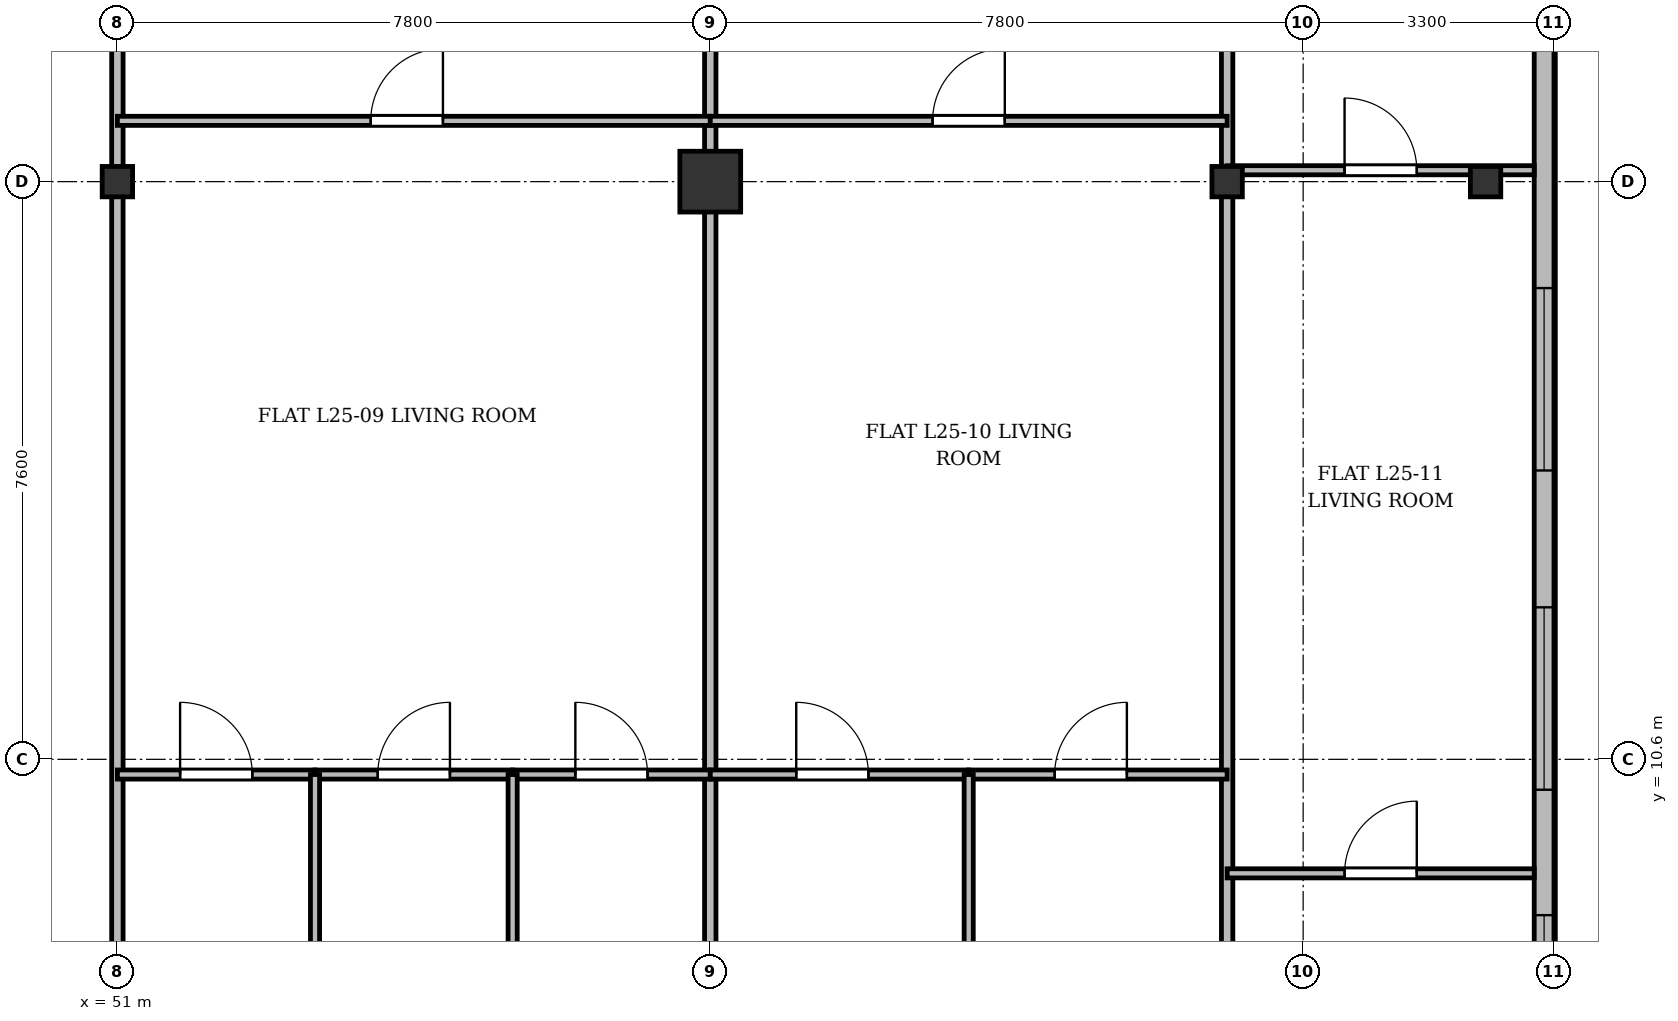
"""IFC4 building model, lengths in metres.
Left out: names, types, materials, properties, quantities, classifications, styles, units other than length and angle.
Written with IfcOpenShell. Run it as: python <this file> out.ifc"""

import sys

from ifc_helpers import new_model, si_unit, direction, frame, frame_2d, origin, origin_2d, place, context, subcontext, project, spatial, rectangle, i_section, extrude, source, transform, mapped, element, fill, save


model = new_model("IFC4")
c1 = context("Model", 3, precision=1e-05, world=origin(), true_north=direction((0.0, 1.0)))
c2 = subcontext(c1, "Body", "Model", "MODEL_VIEW")
j1 = project(units=[si_unit("LENGTHUNIT", "METRE"), si_unit("PLANEANGLEUNIT", "RADIAN")], contexts=[c1])
p1 = place(None, origin())
s1 = spatial("IfcSite", under=j1, at=p1, CompositionType="ELEMENT")
p2 = place(p1, origin())
s2 = spatial("IfcBuilding", under=s1, at=p2, CompositionType="ELEMENT")
p3 = place(p2, frame((0.0, 0.0, 99.7)))
s3 = spatial("IfcBuildingStorey", under=s2, at=p3, CompositionType="ELEMENT", Elevation=99.7)
m1 = source(origin(), c2, "Body", "SweptSolid", [
    extrude(i_section(OverallWidth=0.4, OverallDepth=0.4, WebThickness=0.022, FlangeThickness=0.035, at=origin_2d()), origin(), (0.0, 0.0, 1.0), 3.6),
])
p4 = place(p3, frame((51.0, 18.2, 0.0), z_axis=(0.0, 0.0, 1.0), x_axis=(1.0, 0.0, 0.0)))
e1 = element("IfcColumn", 1, at=p4, inside=s3, PredefinedType="COLUMN", context=c2, shape_type="MappedRepresentation", body=[
    mapped(m1, transform((0.0, 0.0, 0.0), x_axis=(1.0, 0.0, 0.0), y_axis=(0.0, 1.0, 0.0), z_axis=(0.0, 0.0, 1.0), scale=1.0)),
])
m2 = source(origin(), c2, "Body", "SweptSolid", [
    extrude(rectangle(XDim=0.8, YDim=0.8, at=origin_2d()), origin(), (0.0, 0.0, 1.0), 3.6),
])
p5 = place(p3, frame((58.8, 18.2, 0.0), z_axis=(0.0, 0.0, 1.0), x_axis=(1.0, 0.0, 0.0)))
e2 = element("IfcColumn", 2, at=p5, inside=s3, PredefinedType="COLUMN", context=c2, shape_type="MappedRepresentation", body=[
    mapped(m2, transform((0.0, 0.0, 0.0), x_axis=(1.0, 0.0, 0.0), y_axis=(0.0, 1.0, 0.0), z_axis=(0.0, 0.0, 1.0), scale=1.0)),
])
for number, where, z_axis, x_axis in (
    (3, (65.6, 18.2, 0.0), (0.0, 0.0, 1.0), (1.0, 0.0, 0.0)),
    (4, (69.0, 18.2, 0.0), (0.0, 0.0, 1.0), (1.0, 0.0, 0.0)),
):
    element("IfcColumn", number, at=place(p3, frame(where, z_axis=z_axis, x_axis=x_axis)), inside=s3, PredefinedType="COLUMN", context=c2, shape_type="MappedRepresentation", body=[
        mapped(m1, transform((0.0, 0.0, 0.0), x_axis=(1.0, 0.0, 0.0), y_axis=(0.0, 1.0, 0.0), z_axis=(0.0, 0.0, 1.0), scale=1.0)),
    ])
p6 = place(p3, frame((69.77, 45.5, 0.0), z_axis=(0.0, 0.0, 1.0), x_axis=(0.0, -1.0, 0.0)))
e5 = element("IfcWall", 5, at=p6, inside=s3, PredefinedType="SOLIDWALL", context=c2, shape_type="SweptSolid", body=[
    extrude(rectangle(XDim=39.6, YDim=0.26, at=frame_2d((19.8, 0.0))), origin(), (0.0, 0.0, 1.0), 3.34),
])
p7 = place(p6, frame((36.95, 0.0, 0.92)))
e6 = element("IfcOpeningElement", 6, at=p7, cuts=e5, PredefinedType="OPENING", context=c2, shape_type="SweptSolid", body=[
    extrude(rectangle(XDim=1.2, YDim=1.65, at=frame_2d((0.6, 0.825))), frame((0.0, 0.14, 0.0), z_axis=(0.0, -1.0, 0.0), x_axis=(1.0, 0.0, 0.0)), (0.0, 0.0, 1.0), 0.28),
])
p8 = place(p6, frame((32.9, 0.0, 0.92)))
e7 = element("IfcOpeningElement", 7, at=p8, cuts=e5, PredefinedType="OPENING", context=c2, shape_type="SweptSolid", body=[
    extrude(rectangle(XDim=2.4, YDim=2.1, at=frame_2d((1.2, 1.05))), frame((0.0, 0.14, 0.0), z_axis=(0.0, -1.0, 0.0), x_axis=(1.0, 0.0, 0.0)), (0.0, 0.0, 1.0), 0.28),
])
p9 = place(p6, frame((28.7, 0.0, 0.92)))
e8 = element("IfcOpeningElement", 8, at=p9, cuts=e5, PredefinedType="OPENING", context=c2, shape_type="SweptSolid", body=[
    extrude(rectangle(XDim=2.4, YDim=2.1, at=frame_2d((1.2, 1.05))), frame((0.0, 0.14, 0.0), z_axis=(0.0, -1.0, 0.0), x_axis=(1.0, 0.0, 0.0)), (0.0, 0.0, 1.0), 0.28),
])
p10 = place(p6, frame((21.5, 0.0, 0.92)))
e9 = element("IfcOpeningElement", 9, at=p10, cuts=e5, PredefinedType="OPENING", context=c2, shape_type="SweptSolid", body=[
    extrude(rectangle(XDim=2.4, YDim=2.1, at=frame_2d((1.2, 1.05))), frame((0.0, 0.14, 0.0), z_axis=(0.0, -1.0, 0.0), x_axis=(1.0, 0.0, 0.0)), (0.0, 0.0, 1.0), 0.28),
])
p11 = place(p6, frame((7.5, 0.0, 0.92)))
e10 = element("IfcOpeningElement", 10, at=p11, cuts=e5, PredefinedType="OPENING", context=c2, shape_type="SweptSolid", body=[
    extrude(rectangle(XDim=2.4, YDim=2.1, at=frame_2d((1.2, 1.05))), frame((0.0, 0.14, 0.0), z_axis=(0.0, -1.0, 0.0), x_axis=(1.0, 0.0, 0.0)), (0.0, 0.0, 1.0), 0.28),
])
p12 = place(p6, frame((4.5, 0.0, 0.92)))
e11 = element("IfcOpeningElement", 11, at=p12, cuts=e5, PredefinedType="OPENING", context=c2, shape_type="SweptSolid", body=[
    extrude(rectangle(XDim=1.2, YDim=1.65, at=frame_2d((0.6, 0.825))), frame((0.0, 0.14, 0.0), z_axis=(0.0, -1.0, 0.0), x_axis=(1.0, 0.0, 0.0)), (0.0, 0.0, 1.0), 0.28),
])
p13 = place(p6, frame((1.15, 0.0, 0.92)))
e12 = element("IfcOpeningElement", 12, at=p13, cuts=e5, PredefinedType="OPENING", context=c2, shape_type="SweptSolid", body=[
    extrude(rectangle(XDim=1.2, YDim=1.65, at=frame_2d((0.6, 0.825))), frame((0.0, 0.14, 0.0), z_axis=(0.0, -1.0, 0.0), x_axis=(1.0, 0.0, 0.0)), (0.0, 0.0, 1.0), 0.28),
])
for number, where, z_axis, x_axis in (
    (13, (51.0, 3.145, 0.0), (0.0, 0.0, 1.0), (0.0, 1.0, 0.0)),
    (14, (58.8, 3.145, 0.0), (0.0, 0.0, 1.0), (0.0, 1.0, 0.0)),
    (15, (65.6, 3.145, 0.0), (0.0, 0.0, 1.0), (0.0, 1.0, 0.0)),
):
    element("IfcWall", number, at=place(p3, frame(where, z_axis=z_axis, x_axis=x_axis)), inside=s3, PredefinedType="PARTITIONING", context=c2, shape_type="SweptSolid", body=[
        extrude(rectangle(XDim=24.455, YDim=0.15, at=frame_2d((12.228, 0.0))), origin(), (0.0, 0.0, 1.0), 2.84),
    ])
p14 = place(p3, frame((51.0, 19.0, 0.0), z_axis=(0.0, 0.0, 1.0), x_axis=(1.0, 0.0, 0.0)))
e16 = element("IfcWall", 16, at=p14, inside=s3, PredefinedType="PARTITIONING", context=c2, shape_type="SweptSolid", body=[
    extrude(rectangle(XDim=7.8, YDim=0.12, at=frame_2d((3.9, 0.0))), origin(), (0.0, 0.0, 1.0), 2.84),
])
p15 = place(p14, frame((3.333, 0.0, 0.0)))
e17 = element("IfcOpeningElement", 17, at=p15, cuts=e16, PredefinedType="OPENING", context=c2, shape_type="SweptSolid", body=[
    extrude(rectangle(XDim=0.95, YDim=2.15, at=frame_2d((0.475, 1.075))), frame((0.0, 0.07, 0.0), z_axis=(0.0, -1.0, 0.0), x_axis=(1.0, 0.0, 0.0)), (0.0, 0.0, 1.0), 0.14),
])
p16 = place(p3, frame((51.0, 10.4, 0.0), z_axis=(0.0, 0.0, 1.0), x_axis=(1.0, 0.0, 0.0)))
e18 = element("IfcWall", 18, at=p16, inside=s3, PredefinedType="PARTITIONING", context=c2, shape_type="SweptSolid", body=[
    extrude(rectangle(XDim=2.6, YDim=0.12, at=frame_2d((1.3, 0.0))), origin(), (0.0, 0.0, 1.0), 2.84),
])
p17 = place(p16, frame((0.825, 0.0, 0.0)))
e19 = element("IfcOpeningElement", 19, at=p17, cuts=e18, PredefinedType="OPENING", context=c2, shape_type="SweptSolid", body=[
    extrude(rectangle(XDim=0.95, YDim=2.15, at=frame_2d((0.475, 1.075))), frame((0.0, 0.07, 0.0), z_axis=(0.0, -1.0, 0.0), x_axis=(1.0, 0.0, 0.0)), (0.0, 0.0, 1.0), 0.14),
])
p18 = place(p3, frame((53.6, 10.4, 0.0), z_axis=(0.0, 0.0, 1.0), x_axis=(1.0, 0.0, 0.0)))
e20 = element("IfcWall", 20, at=p18, inside=s3, PredefinedType="PARTITIONING", context=c2, shape_type="SweptSolid", body=[
    extrude(rectangle(XDim=2.6, YDim=0.12, at=frame_2d((1.3, 0.0))), origin(), (0.0, 0.0, 1.0), 3.34),
])
p19 = place(p18, frame((0.825, 0.0, 0.0)))
e21 = element("IfcOpeningElement", 21, at=p19, cuts=e20, PredefinedType="OPENING", context=c2, shape_type="SweptSolid", body=[
    extrude(rectangle(XDim=0.95, YDim=2.15, at=frame_2d((0.475, 1.075))), frame((0.0, 0.07, 0.0), z_axis=(0.0, -1.0, 0.0), x_axis=(1.0, 0.0, 0.0)), (0.0, 0.0, 1.0), 0.14),
])
p20 = place(p3, frame((53.6, 3.145, 0.0), z_axis=(0.0, 0.0, 1.0), x_axis=(0.0, 1.0, 0.0)))
e22 = element("IfcWall", 22, at=p20, inside=s3, PredefinedType="PARTITIONING", context=c2, shape_type="SweptSolid", body=[
    extrude(rectangle(XDim=7.255, YDim=0.12, at=frame_2d((3.627, 0.0))), origin(), (0.0, 0.0, 1.0), 2.752),
])
p21 = place(p3, frame((56.2, 10.4, 0.0), z_axis=(0.0, 0.0, 1.0), x_axis=(1.0, 0.0, 0.0)))
e23 = element("IfcWall", 23, at=p21, inside=s3, PredefinedType="PARTITIONING", context=c2, shape_type="SweptSolid", body=[
    extrude(rectangle(XDim=2.6, YDim=0.12, at=frame_2d((1.3, 0.0))), origin(), (0.0, 0.0, 1.0), 2.84),
])
p22 = place(p21, frame((0.825, 0.0, 0.0)))
e24 = element("IfcOpeningElement", 24, at=p22, cuts=e23, PredefinedType="OPENING", context=c2, shape_type="SweptSolid", body=[
    extrude(rectangle(XDim=0.95, YDim=2.15, at=frame_2d((0.475, 1.075))), frame((0.0, 0.07, 0.0), z_axis=(0.0, -1.0, 0.0), x_axis=(1.0, 0.0, 0.0)), (0.0, 0.0, 1.0), 0.14),
])
p23 = place(p3, frame((56.2, 3.145, 0.0), z_axis=(0.0, 0.0, 1.0), x_axis=(0.0, 1.0, 0.0)))
e25 = element("IfcWall", 25, at=p23, inside=s3, PredefinedType="PARTITIONING", context=c2, shape_type="SweptSolid", body=[
    extrude(rectangle(XDim=7.255, YDim=0.12, at=frame_2d((3.627, 0.0))), origin(), (0.0, 0.0, 1.0), 2.752),
])
p24 = place(p3, frame((58.8, 19.0, 0.0), z_axis=(0.0, 0.0, 1.0), x_axis=(1.0, 0.0, 0.0)))
e26 = element("IfcWall", 26, at=p24, inside=s3, PredefinedType="PARTITIONING", context=c2, shape_type="SweptSolid", body=[
    extrude(rectangle(XDim=6.8, YDim=0.12, at=frame_2d((3.4, 0.0))), origin(), (0.0, 0.0, 1.0), 2.84),
])
p25 = place(p24, frame((2.925, 0.0, 0.0)))
e27 = element("IfcOpeningElement", 27, at=p25, cuts=e26, PredefinedType="OPENING", context=c2, shape_type="SweptSolid", body=[
    extrude(rectangle(XDim=0.95, YDim=2.15, at=frame_2d((0.475, 1.075))), frame((0.0, 0.07, 0.0), z_axis=(0.0, -1.0, 0.0), x_axis=(1.0, 0.0, 0.0)), (0.0, 0.0, 1.0), 0.14),
])
p26 = place(p3, frame((58.8, 10.4, 0.0), z_axis=(0.0, 0.0, 1.0), x_axis=(1.0, 0.0, 0.0)))
e28 = element("IfcWall", 28, at=p26, inside=s3, PredefinedType="PARTITIONING", context=c2, shape_type="SweptSolid", body=[
    extrude(rectangle(XDim=3.4, YDim=0.12, at=frame_2d((1.7, 0.0))), origin(), (0.0, 0.0, 1.0), 2.84),
])
p27 = place(p26, frame((1.131, 0.0, 0.0)))
e29 = element("IfcOpeningElement", 29, at=p27, cuts=e28, PredefinedType="OPENING", context=c2, shape_type="SweptSolid", body=[
    extrude(rectangle(XDim=0.95, YDim=2.15, at=frame_2d((0.475, 1.075))), frame((0.0, 0.07, 0.0), z_axis=(0.0, -1.0, 0.0), x_axis=(1.0, 0.0, 0.0)), (0.0, 0.0, 1.0), 0.14),
])
p28 = place(p3, frame((62.2, 10.4, 0.0), z_axis=(0.0, 0.0, 1.0), x_axis=(1.0, 0.0, 0.0)))
e30 = element("IfcWall", 30, at=p28, inside=s3, PredefinedType="PARTITIONING", context=c2, shape_type="SweptSolid", body=[
    extrude(rectangle(XDim=3.4, YDim=0.12, at=frame_2d((1.7, 0.0))), origin(), (0.0, 0.0, 1.0), 2.84),
])
p29 = place(p28, frame((1.131, 0.0, 0.0)))
e31 = element("IfcOpeningElement", 31, at=p29, cuts=e30, PredefinedType="OPENING", context=c2, shape_type="SweptSolid", body=[
    extrude(rectangle(XDim=0.95, YDim=2.15, at=frame_2d((0.475, 1.075))), frame((0.0, 0.07, 0.0), z_axis=(0.0, -1.0, 0.0), x_axis=(1.0, 0.0, 0.0)), (0.0, 0.0, 1.0), 0.14),
])
p30 = place(p3, frame((62.2, 3.145, 0.0), z_axis=(0.0, 0.0, 1.0), x_axis=(0.0, 1.0, 0.0)))
e32 = element("IfcWall", 32, at=p30, inside=s3, PredefinedType="PARTITIONING", context=c2, shape_type="SweptSolid", body=[
    extrude(rectangle(XDim=7.255, YDim=0.12, at=frame_2d((3.627, 0.0))), origin(), (0.0, 0.0, 1.0), 2.752),
])
p31 = place(p3, frame((65.6, 18.35, 0.0), z_axis=(0.0, 0.0, 1.0), x_axis=(1.0, 0.0, 0.0)))
e33 = element("IfcWall", 33, at=p31, inside=s3, PredefinedType="PARTITIONING", context=c2, shape_type="SweptSolid", body=[
    extrude(rectangle(XDim=4.04, YDim=0.12, at=frame_2d((2.02, 0.0))), origin(), (0.0, 0.0, 1.0), 2.752),
])
p32 = place(p31, frame((1.545, 0.0, 0.0)))
e34 = element("IfcOpeningElement", 34, at=p32, cuts=e33, PredefinedType="OPENING", context=c2, shape_type="SweptSolid", body=[
    extrude(rectangle(XDim=0.95, YDim=2.15, at=frame_2d((0.475, 1.075))), frame((0.0, 0.07, 0.0), z_axis=(0.0, -1.0, 0.0), x_axis=(1.0, 0.0, 0.0)), (0.0, 0.0, 1.0), 0.14),
])
p33 = place(p3, frame((65.6, 9.1, 0.0), z_axis=(0.0, 0.0, 1.0), x_axis=(1.0, 0.0, 0.0)))
e35 = element("IfcWall", 35, at=p33, inside=s3, PredefinedType="PARTITIONING", context=c2, shape_type="SweptSolid", body=[
    extrude(rectangle(XDim=4.04, YDim=0.12, at=frame_2d((2.02, 0.0))), origin(), (0.0, 0.0, 1.0), 2.84),
])
p34 = place(p33, frame((1.545, 0.0, 0.0)))
e36 = element("IfcOpeningElement", 36, at=p34, cuts=e35, PredefinedType="OPENING", context=c2, shape_type="SweptSolid", body=[
    extrude(rectangle(XDim=0.95, YDim=2.15, at=frame_2d((0.475, 1.075))), frame((0.0, 0.07, 0.0), z_axis=(0.0, -1.0, 0.0), x_axis=(1.0, 0.0, 0.0)), (0.0, 0.0, 1.0), 0.14),
])
m3 = source(origin(), c2, "Body", "SweptSolid", [
    extrude(rectangle(XDim=1.2, YDim=1.65, at=frame_2d((0.6, 0.825))), frame((0.0, 0.03, 0.0), z_axis=(0.0, -1.0, 0.0), x_axis=(1.0, 0.0, 0.0)), (0.0, 0.0, 1.0), 0.06),
])
p35 = place(p7, origin())
e37 = element("IfcWindow", 37, at=p35, inside=s3, PartitioningType="SINGLE_PANEL", PredefinedType="WINDOW", context=c2, shape_type="MappedRepresentation", body=[
    mapped(m3, transform((0.0, 0.0, 0.0), x_axis=(1.0, 0.0, 0.0), y_axis=(0.0, 1.0, 0.0), z_axis=(0.0, 0.0, 1.0), scale=1.0)),
])
fill(e6, e37)
m4 = source(origin(), c2, "Body", "SweptSolid", [
    extrude(rectangle(XDim=2.4, YDim=2.1, at=frame_2d((1.2, 1.05))), frame((0.0, 0.03, 0.0), z_axis=(0.0, -1.0, 0.0), x_axis=(1.0, 0.0, 0.0)), (0.0, 0.0, 1.0), 0.06),
])
p36 = place(p8, origin())
e38 = element("IfcWindow", 38, at=p36, inside=s3, PartitioningType="SINGLE_PANEL", PredefinedType="WINDOW", context=c2, shape_type="MappedRepresentation", body=[
    mapped(m4, transform((0.0, 0.0, 0.0), x_axis=(1.0, 0.0, 0.0), y_axis=(0.0, 1.0, 0.0), z_axis=(0.0, 0.0, 1.0), scale=1.0)),
])
fill(e7, e38)
p37 = place(p9, origin())
e39 = element("IfcWindow", 39, at=p37, inside=s3, PartitioningType="SINGLE_PANEL", PredefinedType="WINDOW", context=c2, shape_type="MappedRepresentation", body=[
    mapped(m4, transform((0.0, 0.0, 0.0), x_axis=(1.0, 0.0, 0.0), y_axis=(0.0, 1.0, 0.0), z_axis=(0.0, 0.0, 1.0), scale=1.0)),
])
fill(e8, e39)
m5 = source(origin(), c2, "Body", "SweptSolid", [
    extrude(rectangle(XDim=0.95, YDim=2.15, at=frame_2d((0.475, 1.075))), frame((0.0, 0.025, 0.0), z_axis=(0.0, -1.0, 0.0), x_axis=(1.0, 0.0, 0.0)), (0.0, 0.0, 1.0), 0.05),
])
p38 = place(p15, origin())
e40 = element("IfcDoor", 40, at=p38, inside=s3, OperationType="SINGLE_SWING_RIGHT", PredefinedType="DOOR", context=c2, shape_type="MappedRepresentation", body=[
    mapped(m5, transform((0.0, 0.0, 0.0), x_axis=(1.0, 0.0, 0.0), y_axis=(0.0, 1.0, 0.0), z_axis=(0.0, 0.0, 1.0), scale=1.0)),
])
fill(e17, e40)
p39 = place(p17, origin())
e41 = element("IfcDoor", 41, at=p39, inside=s3, OperationType="SINGLE_SWING_LEFT", PredefinedType="DOOR", context=c2, shape_type="MappedRepresentation", body=[
    mapped(m5, transform((0.0, 0.0, 0.0), x_axis=(1.0, 0.0, 0.0), y_axis=(0.0, 1.0, 0.0), z_axis=(0.0, 0.0, 1.0), scale=1.0)),
])
fill(e19, e41)
p40 = place(p19, origin())
e42 = element("IfcDoor", 42, at=p40, inside=s3, OperationType="SINGLE_SWING_RIGHT", PredefinedType="DOOR", context=c2, shape_type="MappedRepresentation", body=[
    mapped(m5, transform((0.0, 0.0, 0.0), x_axis=(1.0, 0.0, 0.0), y_axis=(0.0, 1.0, 0.0), z_axis=(0.0, 0.0, 1.0), scale=1.0)),
])
fill(e21, e42)
p41 = place(p22, origin())
e43 = element("IfcDoor", 43, at=p41, inside=s3, OperationType="SINGLE_SWING_LEFT", PredefinedType="DOOR", context=c2, shape_type="MappedRepresentation", body=[
    mapped(m5, transform((0.0, 0.0, 0.0), x_axis=(1.0, 0.0, 0.0), y_axis=(0.0, 1.0, 0.0), z_axis=(0.0, 0.0, 1.0), scale=1.0)),
])
fill(e24, e43)
p42 = place(p25, origin())
e44 = element("IfcDoor", 44, at=p42, inside=s3, OperationType="SINGLE_SWING_RIGHT", PredefinedType="DOOR", context=c2, shape_type="MappedRepresentation", body=[
    mapped(m5, transform((0.0, 0.0, 0.0), x_axis=(1.0, 0.0, 0.0), y_axis=(0.0, 1.0, 0.0), z_axis=(0.0, 0.0, 1.0), scale=1.0)),
])
fill(e27, e44)
p43 = place(p27, origin())
e45 = element("IfcDoor", 45, at=p43, inside=s3, OperationType="SINGLE_SWING_LEFT", PredefinedType="DOOR", context=c2, shape_type="MappedRepresentation", body=[
    mapped(m5, transform((0.0, 0.0, 0.0), x_axis=(1.0, 0.0, 0.0), y_axis=(0.0, 1.0, 0.0), z_axis=(0.0, 0.0, 1.0), scale=1.0)),
])
fill(e29, e45)
p44 = place(p29, origin())
e46 = element("IfcDoor", 46, at=p44, inside=s3, OperationType="SINGLE_SWING_RIGHT", PredefinedType="DOOR", context=c2, shape_type="MappedRepresentation", body=[
    mapped(m5, transform((0.0, 0.0, 0.0), x_axis=(1.0, 0.0, 0.0), y_axis=(0.0, 1.0, 0.0), z_axis=(0.0, 0.0, 1.0), scale=1.0)),
])
fill(e31, e46)
p45 = place(p32, origin())
e47 = element("IfcDoor", 47, at=p45, inside=s3, OperationType="SINGLE_SWING_LEFT", PredefinedType="DOOR", context=c2, shape_type="MappedRepresentation", body=[
    mapped(m5, transform((0.0, 0.0, 0.0), x_axis=(1.0, 0.0, 0.0), y_axis=(0.0, 1.0, 0.0), z_axis=(0.0, 0.0, 1.0), scale=1.0)),
])
fill(e34, e47)
p46 = place(p34, origin())
e48 = element("IfcDoor", 48, at=p46, inside=s3, OperationType="SINGLE_SWING_RIGHT", PredefinedType="DOOR", context=c2, shape_type="MappedRepresentation", body=[
    mapped(m5, transform((0.0, 0.0, 0.0), x_axis=(1.0, 0.0, 0.0), y_axis=(0.0, 1.0, 0.0), z_axis=(0.0, 0.0, 1.0), scale=1.0)),
])
fill(e36, e48)
save(model, sys.argv[1])
